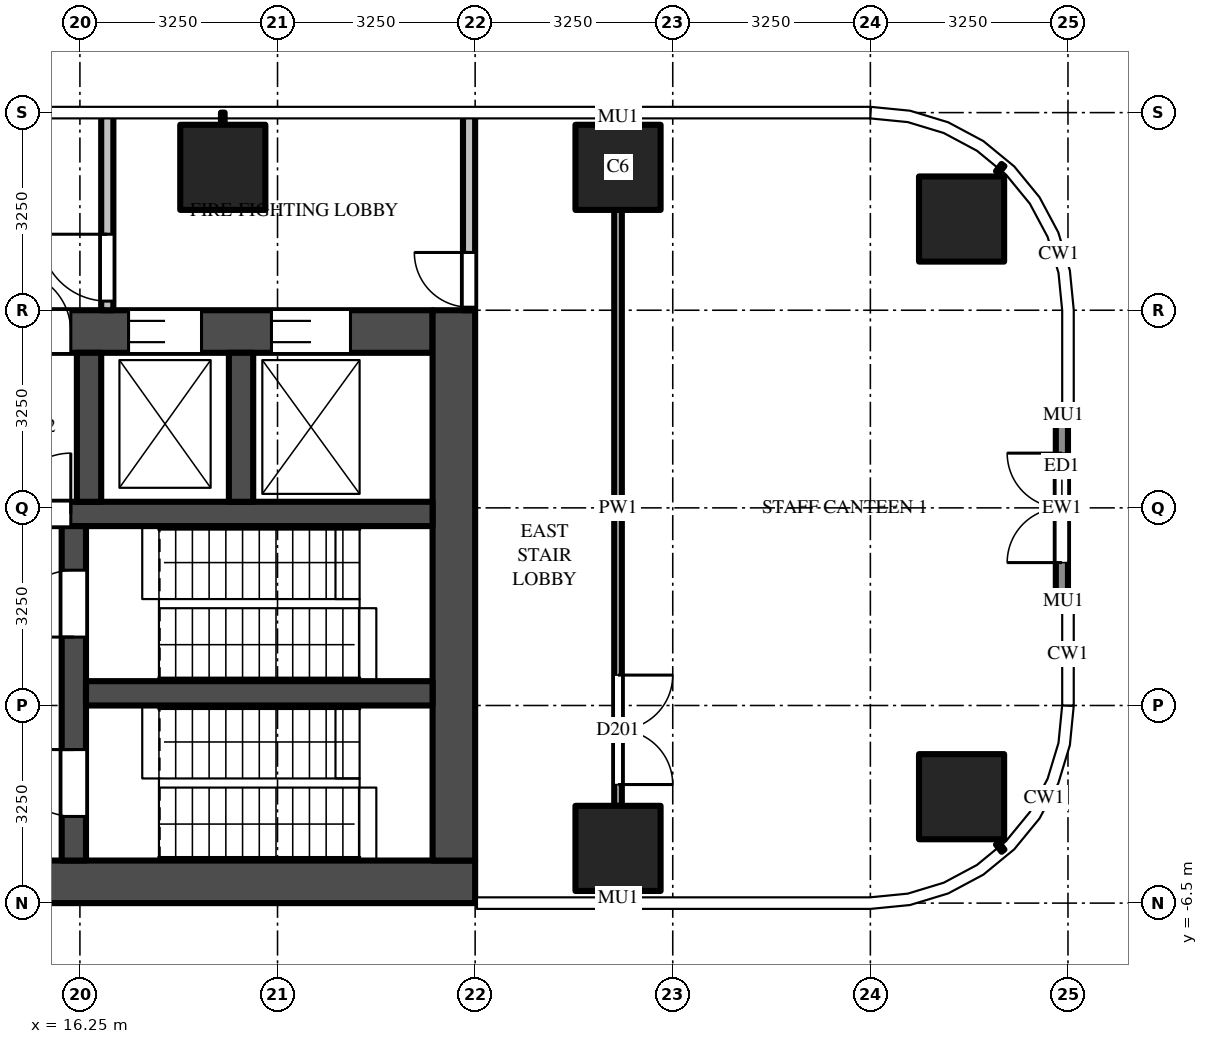
"""IFC4 building model, lengths in metres.
Left out: names, types, materials, properties, quantities, classifications, styles, units other than length and angle.
Written with IfcOpenShell. Run it as: python <this file> out.ifc"""

import sys

from ifc_helpers import new_model, si_unit, direction, frame, frame_2d, origin, origin_2d, place, context, subcontext, project, spatial, rectangle, extrude, source, transform, mapped, element, fill, save


model = new_model("IFC4")
c1 = context("Model", 3, precision=1e-05, world=origin(), true_north=direction((0.0, 1.0)))
c2 = subcontext(c1, "Body", "Model", "MODEL_VIEW")
j1 = project(units=[si_unit("LENGTHUNIT", "METRE"), si_unit("PLANEANGLEUNIT", "RADIAN")], contexts=[c1])
p1 = place(None, origin())
s1 = spatial("IfcSite", under=j1, at=p1, CompositionType="ELEMENT")
p2 = place(p1, origin())
s2 = spatial("IfcBuilding", under=s1, at=p2, CompositionType="ELEMENT")
p3 = place(p2, frame((0.0, 0.0, 79.0)))
s3 = spatial("IfcBuildingStorey", under=s2, at=p3, CompositionType="ELEMENT", Elevation=79.0)
m1 = source(origin(), c2, "Body", "SweptSolid", [
    extrude(rectangle(XDim=1.4, YDim=1.4, at=origin_2d()), origin(), (0.0, 0.0, 1.0), 4.5),
])
for number, where, z_axis, x_axis in (
    (1, (18.6, 5.6, 0.0), (0.0, 0.0, 1.0), (1.0, 0.0, 0.0)),
    (2, (25.1, 5.6, 0.0), (0.0, 0.0, 1.0), (1.0, 0.0, 0.0)),
    (3, (30.75, 4.75, 0.0), (0.0, 0.0, 1.0), (1.0, 0.0, 0.0)),
    (4, (25.1, -5.6, 0.0), (0.0, 0.0, 1.0), (1.0, 0.0, 0.0)),
    (5, (30.75, -4.75, 0.0), (0.0, 0.0, 1.0), (1.0, 0.0, 0.0)),
):
    element("IfcColumn", number, at=place(p3, frame(where, z_axis=z_axis, x_axis=x_axis)), inside=s3, PredefinedType="COLUMN", context=c2, shape_type="MappedRepresentation", body=[
        mapped(m1, transform((0.0, 0.0, 0.0))),
    ])
m2 = source(origin(), c2, "Body", "SweptSolid", [
    extrude(rectangle(XDim=16.45, YDim=0.7, at=frame_2d((8.225, 0.0))), origin(), (0.0, 0.0, 1.0), 4.25),
])
p4 = place(p3, frame((6.3, -6.15, 0.0), z_axis=(0.0, 0.0, 1.0), x_axis=(1.0, 0.0, 0.0)))
e6 = element("IfcWall", 6, at=p4, inside=s3, PredefinedType="SHEAR", context=c2, shape_type="MappedRepresentation", body=[
    mapped(m2, transform((0.0, 0.0, 0.0))),
])
m3 = source(origin(), c2, "Body", "SweptSolid", [
    extrude(rectangle(XDim=14.85, YDim=0.7, at=frame_2d((7.425, 0.0))), origin(), (0.0, 0.0, 1.0), 4.25),
])
p5 = place(p3, frame((7.2, 2.9, 0.0), z_axis=(0.0, 0.0, 1.0), x_axis=(1.0, 0.0, 0.0)))
e7 = element("IfcWall", 7, at=p5, inside=s3, PredefinedType="SHEAR", context=c2, shape_type="MappedRepresentation", body=[
    mapped(m3, transform((0.0, 0.0, 0.0))),
])
m4 = source(origin(), c2, "Body", "SweptSolid", [
    extrude(rectangle(XDim=1.3, YDim=2.1, at=frame_2d((0.65, 1.05))), frame((0.0, 0.36, 0.0), z_axis=(0.0, -1.0, 0.0), x_axis=(1.0, 0.0, 0.0)), (0.0, 0.0, 1.0), 0.72),
])
p6 = place(p5, frame((12.2, 0.0, 0.0)))
e8 = element("IfcOpeningElement", 8, at=p6, cuts=e7, PredefinedType="OPENING", context=c2, shape_type="MappedRepresentation", body=[
    mapped(m4, transform((0.0, 0.0, 0.0))),
])
m5 = source(origin(), c2, "Body", "SweptSolid", [
    extrude(rectangle(XDim=1.2, YDim=2.1, at=frame_2d((0.6, 1.05))), frame((0.0, 0.36, 0.0), z_axis=(0.0, -1.0, 0.0), x_axis=(1.0, 0.0, 0.0)), (0.0, 0.0, 1.0), 0.72),
])
p7 = place(p5, frame((9.85, 0.0, 0.0)))
e9 = element("IfcOpeningElement", 9, at=p7, cuts=e7, PredefinedType="OPENING", context=c2, shape_type="MappedRepresentation", body=[
    mapped(m5, transform((0.0, 0.0, 0.0))),
])
m6 = source(origin(), c2, "Body", "SweptSolid", [
    extrude(rectangle(XDim=1.0, YDim=2.1, at=frame_2d((0.5, 1.05))), frame((0.0, 0.36, 0.0), z_axis=(0.0, -1.0, 0.0), x_axis=(1.0, 0.0, 0.0)), (0.0, 0.0, 1.0), 0.72),
])
p8 = place(p5, frame((7.9, 0.0, 0.0)))
e10 = element("IfcOpeningElement", 10, at=p8, cuts=e7, PredefinedType="OPENING", context=c2, shape_type="MappedRepresentation", body=[
    mapped(m6, transform((0.0, 0.0, 0.0))),
])
m7 = source(origin(), c2, "Body", "SweptSolid", [
    extrude(rectangle(XDim=0.8, YDim=2.1, at=frame_2d((0.4, 1.05))), frame((0.0, 0.36, 0.0), z_axis=(0.0, -1.0, 0.0), x_axis=(1.0, 0.0, 0.0)), (0.0, 0.0, 1.0), 0.72),
])
p9 = place(p5, frame((0.113, 0.0, 0.0)))
e11 = element("IfcOpeningElement", 11, at=p9, cuts=e7, PredefinedType="OPENING", context=c2, shape_type="MappedRepresentation", body=[
    mapped(m7, transform((0.0, 0.0, 0.0))),
])
p10 = place(p5, frame((1.288, 0.0, 0.0)))
e12 = element("IfcOpeningElement", 12, at=p10, cuts=e7, PredefinedType="OPENING", context=c2, shape_type="MappedRepresentation", body=[
    mapped(m7, transform((0.0, 0.0, 0.0))),
])
p11 = place(p5, frame((2.712, 0.0, 0.0)))
e13 = element("IfcOpeningElement", 13, at=p11, cuts=e7, PredefinedType="OPENING", context=c2, shape_type="MappedRepresentation", body=[
    mapped(m7, transform((0.0, 0.0, 0.0))),
])
p12 = place(p5, frame((3.887, 0.0, 0.0)))
e14 = element("IfcOpeningElement", 14, at=p12, cuts=e7, PredefinedType="OPENING", context=c2, shape_type="MappedRepresentation", body=[
    mapped(m7, transform((0.0, 0.0, 0.0))),
])
p13 = place(p5, frame((5.312, 0.0, 0.0)))
e15 = element("IfcOpeningElement", 15, at=p13, cuts=e7, PredefinedType="OPENING", context=c2, shape_type="MappedRepresentation", body=[
    mapped(m7, transform((0.0, 0.0, 0.0))),
])
p14 = place(p5, frame((6.488, 0.0, 0.0)))
e16 = element("IfcOpeningElement", 16, at=p14, cuts=e7, PredefinedType="OPENING", context=c2, shape_type="MappedRepresentation", body=[
    mapped(m7, transform((0.0, 0.0, 0.0))),
])
m8 = source(origin(), c2, "Body", "SweptSolid", [
    extrude(rectangle(XDim=9.05, YDim=0.7, at=frame_2d((4.525, 0.0))), origin(), (0.0, 0.0, 1.0), 4.25),
])
p15 = place(p3, frame((22.4, -5.8, 0.0), z_axis=(0.0, 0.0, 1.0), x_axis=(0.0, 1.0, 0.0)))
e17 = element("IfcWall", 17, at=p15, inside=s3, PredefinedType="SHEAR", context=c2, shape_type="MappedRepresentation", body=[
    mapped(m8, transform((0.0, 0.0, 0.0))),
])
m9 = source(origin(), c2, "Body", "SweptSolid", [
    extrude(rectangle(XDim=14.85, YDim=0.4, at=frame_2d((7.425, 0.0))), origin(), (0.0, 0.0, 1.0), 4.25),
])
p16 = place(p3, frame((7.2, -0.1, 0.0), z_axis=(0.0, 0.0, 1.0), x_axis=(1.0, 0.0, 0.0)))
e18 = element("IfcWall", 18, at=p16, inside=s3, PredefinedType="SHEAR", context=c2, shape_type="MappedRepresentation", body=[
    mapped(m9, transform((0.0, 0.0, 0.0))),
])
m10 = source(origin(), c2, "Body", "SweptSolid", [
    extrude(rectangle(XDim=1.0, YDim=2.1, at=frame_2d((0.5, 1.05))), frame((0.0, 0.21, 0.0), z_axis=(0.0, -1.0, 0.0), x_axis=(1.0, 0.0, 0.0)), (0.0, 0.0, 1.0), 0.42),
])
p17 = place(p16, frame((7.9, 0.0, 0.0)))
e19 = element("IfcOpeningElement", 19, at=p17, cuts=e18, PredefinedType="OPENING", context=c2, shape_type="MappedRepresentation", body=[
    mapped(m10, transform((0.0, 0.0, 0.0))),
])
m11 = source(origin(), c2, "Body", "SweptSolid", [
    extrude(rectangle(XDim=5.5, YDim=0.4, at=frame_2d((2.75, 0.0))), origin(), (0.0, 0.0, 1.0), 4.25),
])
p18 = place(p3, frame((16.15, -5.8, 0.0), z_axis=(0.0, 0.0, 1.0), x_axis=(0.0, 1.0, 0.0)))
e20 = element("IfcWall", 20, at=p18, inside=s3, PredefinedType="SHEAR", context=c2, shape_type="MappedRepresentation", body=[
    mapped(m11, transform((0.0, 0.0, 0.0))),
])
m12 = source(origin(), c2, "Body", "SweptSolid", [
    extrude(rectangle(XDim=1.1, YDim=2.1, at=frame_2d((0.55, 1.05))), frame((0.0, 0.21, 0.0), z_axis=(0.0, -1.0, 0.0), x_axis=(1.0, 0.0, 0.0)), (0.0, 0.0, 1.0), 0.42),
])
p19 = place(p18, frame((0.725, 0.0, 0.0)))
e21 = element("IfcOpeningElement", 21, at=p19, cuts=e20, PredefinedType="OPENING", context=c2, shape_type="MappedRepresentation", body=[
    mapped(m12, transform((0.0, 0.0, 0.0))),
])
p20 = place(p18, frame((3.675, 0.0, 0.0)))
e22 = element("IfcOpeningElement", 22, at=p20, cuts=e20, PredefinedType="OPENING", context=c2, shape_type="MappedRepresentation", body=[
    mapped(m12, transform((0.0, 0.0, 0.0))),
])
m13 = source(origin(), c2, "Body", "SweptSolid", [
    extrude(rectangle(XDim=5.7, YDim=0.4, at=frame_2d((2.85, 0.0))), origin(), (0.0, 0.0, 1.0), 4.25),
])
p21 = place(p3, frame((16.35, -3.05, 0.0), z_axis=(0.0, 0.0, 1.0), x_axis=(1.0, 0.0, 0.0)))
e23 = element("IfcWall", 23, at=p21, inside=s3, PredefinedType="SHEAR", context=c2, shape_type="MappedRepresentation", body=[
    mapped(m13, transform((0.0, 0.0, 0.0))),
])
m14 = source(origin(), c2, "Body", "SweptSolid", [
    extrude(rectangle(XDim=2.45, YDim=0.4, at=frame_2d((1.225, 0.0))), origin(), (0.0, 0.0, 1.0), 4.25),
])
for number, where, z_axis, x_axis in (
    (24, (16.4, 0.1, 0.0), (0.0, 0.0, 1.0), (0.0, 1.0, 0.0)),
    (25, (18.9, 0.1, 0.0), (0.0, 0.0, 1.0), (0.0, 1.0, 0.0)),
):
    element("IfcWall", number, at=place(p3, frame(where, z_axis=z_axis, x_axis=x_axis)), inside=s3, PredefinedType="SHEAR", context=c2, shape_type="MappedRepresentation", body=[
        mapped(m14, transform((0.0, 0.0, 0.0))),
    ])
m15 = source(origin(), c2, "Body", "SweptSolid", [
    extrude(rectangle(XDim=3.25, YDim=0.2, at=frame_2d((1.625, 0.0))), origin(), (0.0, 0.0, 1.0), 4.25),
])
p22 = place(p3, frame((16.7, 3.25, 0.0), z_axis=(0.0, 0.0, 1.0), x_axis=(0.0, 1.0, 0.0)))
e26 = element("IfcWall", 26, at=p22, inside=s3, PredefinedType="PARTITIONING", context=c2, shape_type="MappedRepresentation", body=[
    mapped(m15, transform((0.0, 0.0, 0.0))),
])
m16 = source(origin(), c2, "Body", "SweptSolid", [
    extrude(rectangle(XDim=1.1, YDim=2.1, at=frame_2d((0.55, 1.05))), frame((0.0, 0.11, 0.0), z_axis=(0.0, -1.0, 0.0), x_axis=(1.0, 0.0, 0.0)), (0.0, 0.0, 1.0), 0.22),
])
p23 = place(p22, frame((0.15, 0.0, 0.0)))
e27 = element("IfcOpeningElement", 27, at=p23, cuts=e26, PredefinedType="OPENING", context=c2, shape_type="MappedRepresentation", body=[
    mapped(m16, transform((0.0, 0.0, 0.0))),
])
p24 = place(p3, frame((22.65, 3.25, 0.0), z_axis=(0.0, 0.0, 1.0), x_axis=(0.0, 1.0, 0.0)))
e28 = element("IfcWall", 28, at=p24, inside=s3, PredefinedType="PARTITIONING", context=c2, shape_type="MappedRepresentation", body=[
    mapped(m15, transform((0.0, 0.0, 0.0))),
])
m17 = source(origin(), c2, "Body", "SweptSolid", [
    extrude(rectangle(XDim=0.9, YDim=2.1, at=frame_2d((0.45, 1.05))), frame((0.0, 0.11, 0.0), z_axis=(0.0, -1.0, 0.0), x_axis=(1.0, 0.0, 0.0)), (0.0, 0.0, 1.0), 0.22),
])
p25 = place(p24, frame((0.05, 0.0, 0.0)))
e29 = element("IfcOpeningElement", 29, at=p25, cuts=e28, PredefinedType="OPENING", context=c2, shape_type="MappedRepresentation", body=[
    mapped(m17, transform((0.0, 0.0, 0.0))),
])
m18 = source(origin(), c2, "Body", "SweptSolid", [
    extrude(rectangle(XDim=3.0, YDim=0.2, at=frame_2d((1.5, 0.0))), origin(), (0.0, 0.0, 1.0), 4.25),
])
p26 = place(p3, frame((32.4, -1.5, 0.0), z_axis=(0.0, 0.0, 1.0), x_axis=(0.0, 1.0, 0.0)))
e30 = element("IfcWall", 30, at=p26, inside=s3, PredefinedType="SOLIDWALL", context=c2, shape_type="MappedRepresentation", body=[
    mapped(m18, transform((0.0, 0.0, 0.0))),
])
m19 = source(origin(), c2, "Body", "SweptSolid", [
    extrude(rectangle(XDim=1.8, YDim=2.4, at=frame_2d((0.9, 1.2))), frame((0.0, 0.11, 0.0), z_axis=(0.0, -1.0, 0.0), x_axis=(1.0, 0.0, 0.0)), (0.0, 0.0, 1.0), 0.22),
])
p27 = place(p26, frame((0.6, 0.0, 0.0)))
e31 = element("IfcOpeningElement", 31, at=p27, cuts=e30, PredefinedType="OPENING", context=c2, shape_type="MappedRepresentation", body=[
    mapped(m19, transform((0.0, 0.0, 0.0))),
])
m20 = source(origin(), c2, "Body", "SweptSolid", [
    extrude(rectangle(XDim=9.8, YDim=0.125, at=frame_2d((4.9, 0.0))), origin(), (0.0, 0.0, 1.0), 3.468),
])
p28 = place(p3, frame((25.1, 4.9, 0.0), z_axis=(0.0, 0.0, 1.0), x_axis=(0.0, -1.0, 0.0)))
e32 = element("IfcWall", 32, at=p28, inside=s3, PredefinedType="PARTITIONING", context=c2, shape_type="MappedRepresentation", body=[
    mapped(m20, transform((0.0, 0.0, 0.0))),
])
m21 = source(origin(), c2, "Body", "SweptSolid", [
    extrude(rectangle(XDim=1.8, YDim=2.1, at=frame_2d((0.9, 1.05))), frame((0.0, 0.073, 0.0), z_axis=(0.0, -1.0, 0.0), x_axis=(1.0, 0.0, 0.0)), (0.0, 0.0, 1.0), 0.145),
])
p29 = place(p28, frame((7.65, 0.0, 0.0)))
e33 = element("IfcOpeningElement", 33, at=p29, cuts=e32, PredefinedType="OPENING", context=c2, shape_type="MappedRepresentation", body=[
    mapped(m21, transform((0.0, 0.0, 0.0))),
])
m22 = source(origin(), c2, "Body", "SweptSolid", [
    extrude(rectangle(XDim=1.3, YDim=2.1, at=frame_2d((0.65, 1.05))), frame((0.0, -0.275, 0.0), z_axis=(0.0, -1.0, 0.0), x_axis=(1.0, 0.0, 0.0)), (0.0, 0.0, 1.0), 0.05),
])
p30 = place(p6, origin())
e34 = element("IfcDoor", 34, at=p30, inside=s3, OperationType="DOUBLE_DOOR_SLIDING", PredefinedType="DOOR", context=c2, shape_type="MappedRepresentation", body=[
    mapped(m22, transform((0.0, 0.0, 0.0))),
])
fill(e8, e34)
m23 = source(origin(), c2, "Body", "SweptSolid", [
    extrude(rectangle(XDim=1.2, YDim=2.1, at=frame_2d((0.6, 1.05))), frame((0.0, -0.275, 0.0), z_axis=(0.0, -1.0, 0.0), x_axis=(1.0, 0.0, 0.0)), (0.0, 0.0, 1.0), 0.05),
])
p31 = place(p7, origin())
e35 = element("IfcDoor", 35, at=p31, inside=s3, OperationType="DOUBLE_DOOR_SLIDING", PredefinedType="DOOR", context=c2, shape_type="MappedRepresentation", body=[
    mapped(m23, transform((0.0, 0.0, 0.0))),
])
fill(e9, e35)
m24 = source(origin(), c2, "Body", "SweptSolid", [
    extrude(rectangle(XDim=1.1, YDim=2.1, at=frame_2d((0.55, 1.05))), frame((0.0, 0.025, 0.0), z_axis=(0.0, -1.0, 0.0), x_axis=(1.0, 0.0, 0.0)), (0.0, 0.0, 1.0), 0.05),
])
p32 = place(p19, origin())
e36 = element("IfcDoor", 36, at=p32, inside=s3, OperationType="SINGLE_SWING_RIGHT", PredefinedType="DOOR", context=c2, shape_type="MappedRepresentation", body=[
    mapped(m24, transform((0.0, 0.0, 0.0))),
])
fill(e21, e36)
p33 = place(p20, origin())
e37 = element("IfcDoor", 37, at=p33, inside=s3, OperationType="SINGLE_SWING_LEFT", PredefinedType="DOOR", context=c2, shape_type="MappedRepresentation", body=[
    mapped(m24, transform((0.0, 0.0, 0.0))),
])
fill(e22, e37)
m25 = source(origin(), c2, "Body", "SweptSolid", [
    extrude(rectangle(XDim=1.0, YDim=2.1, at=frame_2d((0.5, 1.05))), frame((0.0, 0.025, 0.0), z_axis=(0.0, -1.0, 0.0), x_axis=(1.0, 0.0, 0.0)), (0.0, 0.0, 1.0), 0.05),
])
p34 = place(p17, origin())
e38 = element("IfcDoor", 38, at=p34, inside=s3, OperationType="SINGLE_SWING_RIGHT", PredefinedType="DOOR", context=c2, shape_type="MappedRepresentation", body=[
    mapped(m25, transform((0.0, 0.0, 0.0))),
])
fill(e19, e38)
m26 = source(origin(), c2, "Body", "SweptSolid", [
    extrude(rectangle(XDim=1.0, YDim=2.1, at=frame_2d((0.5, 1.05))), frame((0.0, -0.275, 0.0), z_axis=(0.0, -1.0, 0.0), x_axis=(1.0, 0.0, 0.0)), (0.0, 0.0, 1.0), 0.05),
])
p35 = place(p8, origin())
e39 = element("IfcDoor", 39, at=p35, inside=s3, OperationType="SINGLE_SWING_LEFT", PredefinedType="DOOR", context=c2, shape_type="MappedRepresentation", body=[
    mapped(m26, transform((0.0, 0.0, 0.0))),
])
fill(e10, e39)
p36 = place(p23, origin())
e40 = element("IfcDoor", 40, at=p36, inside=s3, OperationType="SINGLE_SWING_RIGHT", PredefinedType="DOOR", context=c2, shape_type="MappedRepresentation", body=[
    mapped(m24, transform((0.0, 0.0, 0.0))),
])
fill(e27, e40)
m27 = source(origin(), c2, "Body", "SweptSolid", [
    extrude(rectangle(XDim=0.9, YDim=2.1, at=frame_2d((0.45, 1.05))), frame((0.0, 0.025, 0.0), z_axis=(0.0, -1.0, 0.0), x_axis=(1.0, 0.0, 0.0)), (0.0, 0.0, 1.0), 0.05),
])
p37 = place(p25, origin())
e41 = element("IfcDoor", 41, at=p37, inside=s3, OperationType="SINGLE_SWING_RIGHT", PredefinedType="DOOR", context=c2, shape_type="MappedRepresentation", body=[
    mapped(m27, transform((0.0, 0.0, 0.0))),
])
fill(e29, e41)
m28 = source(origin(), c2, "Body", "SweptSolid", [
    extrude(rectangle(XDim=1.8, YDim=2.4, at=frame_2d((0.9, 1.2))), frame((0.0, 0.025, 0.0), z_axis=(0.0, -1.0, 0.0), x_axis=(1.0, 0.0, 0.0)), (0.0, 0.0, 1.0), 0.05),
])
p38 = place(p27, origin())
e42 = element("IfcDoor", 42, at=p38, inside=s3, OperationType="DOUBLE_DOOR_SINGLE_SWING", PredefinedType="DOOR", context=c2, shape_type="MappedRepresentation", body=[
    mapped(m28, transform((0.0, 0.0, 0.0))),
])
fill(e31, e42)
m29 = source(origin(), c2, "Body", "SweptSolid", [
    extrude(rectangle(XDim=1.8, YDim=2.1, at=frame_2d((0.9, 1.05))), frame((0.0, 0.025, 0.0), z_axis=(0.0, -1.0, 0.0), x_axis=(1.0, 0.0, 0.0)), (0.0, 0.0, 1.0), 0.05),
])
p39 = place(p29, origin())
e43 = element("IfcDoor", 43, at=p39, inside=s3, OperationType="DOUBLE_DOOR_SINGLE_SWING", PredefinedType="DOOR", context=c2, shape_type="MappedRepresentation", body=[
    mapped(m29, transform((0.0, 0.0, 0.0))),
])
fill(e33, e43)
save(model, sys.argv[1])
